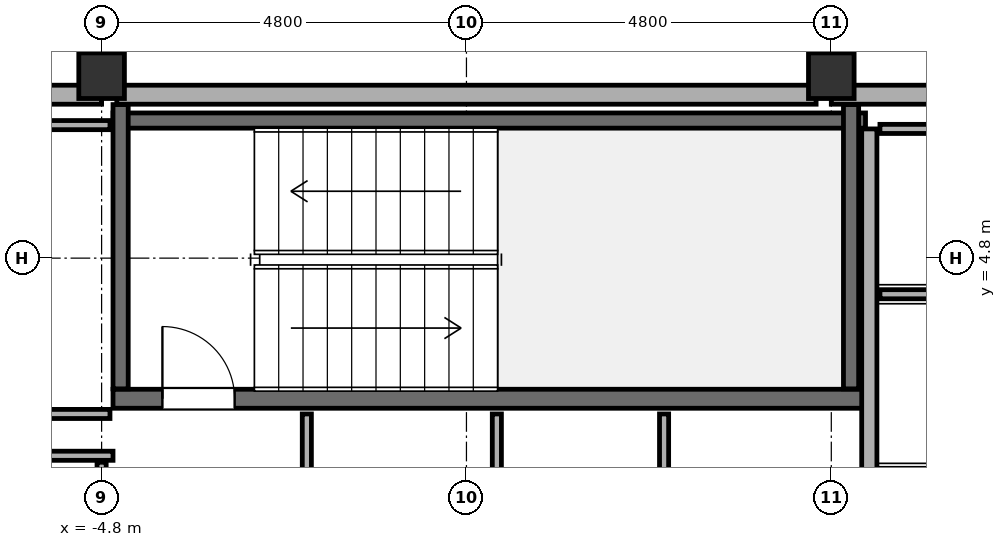
"""IFC4 building model, lengths in metres.
Left out: names, types, materials, properties, quantities, classifications, styles, units other than length and angle.
Written with IfcOpenShell. Run it as: python <this file> out.ifc"""

import sys

from ifc_helpers import new_model, si_unit, direction, frame, frame_2d, origin, origin_2d, place, context, subcontext, project, spatial, rectangle, hollow_rectangle, extrude, element, fill, save


model = new_model("IFC4")
c1 = context("Model", 3, precision=1e-05, world=origin(), true_north=direction((0.0, 1.0)))
c2 = subcontext(c1, "Body", "Model", "MODEL_VIEW")
j1 = project(units=[si_unit("LENGTHUNIT", "METRE"), si_unit("PLANEANGLEUNIT", "RADIAN")], contexts=[c1])
p1 = place(None, origin())
s1 = spatial("IfcSite", under=j1, at=p1, CompositionType="ELEMENT")
p2 = place(p1, origin())
s2 = spatial("IfcBuilding", under=s1, at=p2, CompositionType="ELEMENT")
p3 = place(p2, frame((0.0, 0.0, 222.3)))
s3 = spatial("IfcBuildingStorey", under=s2, at=p3, CompositionType="ELEMENT", Elevation=222.3)
for number, where, z_axis, x_axis in (
    (1, (-4.8, 7.2, 0.0), (0.0, 0.0, 1.0), (1.0, 0.0, 0.0)),
    (2, (4.8, 7.2, 0.0), (0.0, 0.0, 1.0), (1.0, 0.0, 0.0)),
):
    element("IfcColumn", number, at=place(p3, frame(where, z_axis=z_axis, x_axis=x_axis)), inside=s3, PredefinedType="COLUMN", context=c2, shape_type="SweptSolid", body=[
        extrude(hollow_rectangle(XDim=0.6, YDim=0.6, WallThickness=0.028, at=origin_2d()), origin(), (0.0, 0.0, 1.0), 3.85),
    ])
p4 = place(p3, frame((-14.2, 6.95, 0.0), z_axis=(0.0, 0.0, 1.0), x_axis=(1.0, 0.0, 0.0)))
e3 = element("IfcWall", 3, at=p4, inside=s3, PredefinedType="SOLIDWALL", context=c2, shape_type="SweptSolid", body=[
    extrude(rectangle(XDim=9.4, YDim=0.25, at=frame_2d((4.7, 0.0))), origin(), (0.0, 0.0, 1.0), 2.27),
])
p5 = place(p4, frame((4.9, 0.0, 0.0)))
e4 = element("IfcOpeningElement", 4, at=p5, cuts=e3, PredefinedType="OPENING", context=c2, shape_type="SweptSolid", body=[
    extrude(rectangle(XDim=1.0, YDim=2.15, at=frame_2d((0.5, 1.075))), frame((0.0, 0.14, 0.0), z_axis=(0.0, -1.0, 0.0), x_axis=(1.0, 0.0, 0.0)), (0.0, 0.0, 1.0), 0.28),
])
p6 = place(p3, frame((-4.6, 6.95, 0.0), z_axis=(0.0, 0.0, 1.0), x_axis=(1.0, 0.0, 0.0)))
e5 = element("IfcWall", 5, at=p6, inside=s3, PredefinedType="SOLIDWALL", context=c2, shape_type="SweptSolid", body=[
    extrude(rectangle(XDim=9.2, YDim=0.25, at=frame_2d((4.6, 0.0))), origin(), (0.0, 0.0, 1.0), 2.27),
])
p7 = place(p3, frame((4.8, 6.95, 0.0), z_axis=(0.0, 0.0, 1.0), x_axis=(1.0, 0.0, 0.0)))
e6 = element("IfcWall", 6, at=p7, inside=s3, PredefinedType="SOLIDWALL", context=c2, shape_type="SweptSolid", body=[
    extrude(rectangle(XDim=9.4, YDim=0.25, at=frame_2d((4.7, 0.0))), origin(), (0.0, 0.0, 1.0), 2.27),
])
p8 = place(p7, frame((3.5, 0.0, 0.0)))
e7 = element("IfcOpeningElement", 7, at=p8, cuts=e6, PredefinedType="OPENING", context=c2, shape_type="SweptSolid", body=[
    extrude(rectangle(XDim=1.2, YDim=2.2, at=frame_2d((0.6, 1.1))), frame((0.0, 0.14, 0.0), z_axis=(0.0, -1.0, 0.0), x_axis=(1.0, 0.0, 0.0)), (0.0, 0.0, 1.0), 0.28),
])
p9 = place(p3, frame((-4.65, 2.95, -0.18), z_axis=(0.0, 0.0, 1.0), x_axis=(1.0, 0.0, 0.0)))
e8 = element("IfcWall", 8, at=p9, inside=s3, PredefinedType="SOLIDWALL", context=c2, shape_type="SweptSolid", body=[
    extrude(rectangle(XDim=9.9, YDim=0.25, at=frame_2d((4.95, 0.0))), origin(), (0.0, 0.0, 1.0), 3.85),
])
p10 = place(p9, frame((0.65, 0.0, 0.18)))
e9 = element("IfcOpeningElement", 9, at=p10, cuts=e8, PredefinedType="OPENING", context=c2, shape_type="SweptSolid", body=[
    extrude(rectangle(XDim=0.95, YDim=2.15, at=frame_2d((0.475, 1.075))), frame((0.0, 0.14, 0.0), z_axis=(0.0, -1.0, 0.0), x_axis=(1.0, 0.0, 0.0)), (0.0, 0.0, 1.0), 0.28),
])
p11 = place(p3, frame((-4.65, 6.61, -0.18), z_axis=(0.0, 0.0, 1.0), x_axis=(1.0, 0.0, 0.0)))
e10 = element("IfcWall", 10, at=p11, inside=s3, PredefinedType="SOLIDWALL", context=c2, shape_type="SweptSolid", body=[
    extrude(rectangle(XDim=9.9, YDim=0.2, at=frame_2d((4.95, 0.0))), origin(), (0.0, 0.0, 1.0), 3.85),
])
for number, where, z_axis, x_axis in (
    (11, (-4.55, 3.08, -0.18), (0.0, 0.0, 1.0), (0.0, 1.0, 0.0)),
    (12, (5.06, 3.08, -0.18), (0.0, 0.0, 1.0), (0.0, 1.0, 0.0)),
):
    element("IfcWall", number, at=place(p3, frame(where, z_axis=z_axis, x_axis=x_axis)), inside=s3, PredefinedType="SOLIDWALL", context=c2, shape_type="SweptSolid", body=[
        extrude(rectangle(XDim=3.74, YDim=0.2, at=frame_2d((1.87, 0.0))), origin(), (0.0, 0.0, 1.0), 3.85),
    ])
p12 = place(p3, frame((5.3, -0.3, 0.0), z_axis=(0.0, 0.0, 1.0), x_axis=(0.0, 1.0, 0.0)))
e13 = element("IfcWall", 13, at=p12, inside=s3, PredefinedType="SOLIDWALL", context=c2, shape_type="SweptSolid", body=[
    extrude(rectangle(XDim=6.8, YDim=0.2, at=frame_2d((3.4, 0.0))), origin(), (0.0, 0.0, 1.0), 3.67),
])
for number, where, z_axis, x_axis in (
    (14, (5.44, 4.325, 0.0), (0.0, 0.0, 1.0), (1.0, 0.0, 0.0)),
    (15, (5.44, 6.5, 0.0), (0.0, 0.0, 1.0), (1.0, 0.0, 0.0)),
):
    element("IfcWall", number, at=place(p3, frame(where, z_axis=z_axis, x_axis=x_axis)), inside=s3, PredefinedType="PARTITIONING", context=c2, shape_type="SweptSolid", body=[
        extrude(rectangle(XDim=2.12, YDim=0.12, at=frame_2d((1.06, 0.0))), origin(), (0.0, 0.0, 1.0), 3.67),
    ])
p13 = place(p3, frame((-7.0, 2.2, 0.0), z_axis=(0.0, 0.0, 1.0), x_axis=(1.0, 0.0, 0.0)))
e16 = element("IfcWall", 16, at=p13, inside=s3, PredefinedType="PARTITIONING", context=c2, shape_type="SweptSolid", body=[
    extrude(rectangle(XDim=2.35, YDim=0.12, at=frame_2d((1.175, 0.0))), origin(), (0.0, 0.0, 1.0), 3.67),
])
for number, where, z_axis, x_axis in (
    (17, (-7.0, 2.75, 0.0), (0.0, 0.0, 1.0), (1.0, 0.0, 0.0)),
    (18, (-7.0, 6.55, 0.0), (0.0, 0.0, 1.0), (1.0, 0.0, 0.0)),
):
    element("IfcWall", number, at=place(p3, frame(where, z_axis=z_axis, x_axis=x_axis)), inside=s3, PredefinedType="PARTITIONING", context=c2, shape_type="SweptSolid", body=[
        extrude(rectangle(XDim=2.31, YDim=0.12, at=frame_2d((1.155, 0.0))), origin(), (0.0, 0.0, 1.0), 3.67),
    ])
p14 = place(p3, frame((-4.8, -6.415, 0.0), z_axis=(0.0, 0.0, 1.0), x_axis=(0.0, 1.0, 0.0)))
e19 = element("IfcWall", 19, at=p14, inside=s3, PredefinedType="PARTITIONING", context=c2, shape_type="SweptSolid", body=[
    extrude(rectangle(XDim=8.53, YDim=0.12, at=frame_2d((4.265, 0.0))), origin(), (0.0, 0.0, 1.0), 3.67),
])
p15 = place(p14, frame((3.965, 0.0, 0.0)))
e20 = element("IfcOpeningElement", 20, at=p15, cuts=e19, PredefinedType="OPENING", context=c2, shape_type="SweptSolid", body=[
    extrude(rectangle(XDim=0.9, YDim=2.1, at=frame_2d((0.45, 1.05))), frame((0.0, 0.075, 0.0), z_axis=(0.0, -1.0, 0.0), x_axis=(1.0, 0.0, 0.0)), (0.0, 0.0, 1.0), 0.15),
])
p16 = place(p3, frame((-2.1, -6.415, 0.0), z_axis=(0.0, 0.0, 1.0), x_axis=(0.0, 1.0, 0.0)))
e21 = element("IfcWall", 21, at=p16, inside=s3, PredefinedType="PARTITIONING", context=c2, shape_type="SweptSolid", body=[
    extrude(rectangle(XDim=9.165, YDim=0.12, at=frame_2d((4.583, 0.0))), origin(), (0.0, 0.0, 1.0), 3.67),
])
p17 = place(p16, frame((1.765, 0.0, 0.0)))
e22 = element("IfcOpeningElement", 22, at=p17, cuts=e21, PredefinedType="OPENING", context=c2, shape_type="SweptSolid", body=[
    extrude(rectangle(XDim=0.9, YDim=2.1, at=frame_2d((0.45, 1.05))), frame((0.0, 0.075, 0.0), z_axis=(0.0, -1.0, 0.0), x_axis=(1.0, 0.0, 0.0)), (0.0, 0.0, 1.0), 0.15),
])
p18 = place(p16, frame((6.565, 0.0, 0.0)))
e23 = element("IfcOpeningElement", 23, at=p18, cuts=e21, PredefinedType="OPENING", context=c2, shape_type="SweptSolid", body=[
    extrude(rectangle(XDim=0.9, YDim=2.1, at=frame_2d((0.45, 1.05))), frame((0.0, 0.075, 0.0), z_axis=(0.0, -1.0, 0.0), x_axis=(1.0, 0.0, 0.0)), (0.0, 0.0, 1.0), 0.15),
])
p19 = place(p3, frame((0.4, -6.415, 0.0), z_axis=(0.0, 0.0, 1.0), x_axis=(0.0, 1.0, 0.0)))
e24 = element("IfcWall", 24, at=p19, inside=s3, PredefinedType="PARTITIONING", context=c2, shape_type="SweptSolid", body=[
    extrude(rectangle(XDim=9.165, YDim=0.12, at=frame_2d((4.583, 0.0))), origin(), (0.0, 0.0, 1.0), 3.67),
])
p20 = place(p3, frame((2.6, 0.3, 0.0), z_axis=(0.0, 0.0, 1.0), x_axis=(0.0, 1.0, 0.0)))
e25 = element("IfcWall", 25, at=p20, inside=s3, PredefinedType="PARTITIONING", context=c2, shape_type="SweptSolid", body=[
    extrude(rectangle(XDim=2.45, YDim=0.12, at=frame_2d((1.225, 0.0))), origin(), (0.0, 0.0, 1.0), 3.67),
])
p21 = place(p20, frame((0.75, 0.0, 0.0)))
e26 = element("IfcOpeningElement", 26, at=p21, cuts=e25, PredefinedType="OPENING", context=c2, shape_type="SweptSolid", body=[
    extrude(rectangle(XDim=0.9, YDim=2.1, at=frame_2d((0.45, 1.05))), frame((0.0, 0.075, 0.0), z_axis=(0.0, -1.0, 0.0), x_axis=(1.0, 0.0, 0.0)), (0.0, 0.0, 1.0), 0.15),
])
p22 = place(p10, origin())
e27 = element("IfcDoor", 27, at=p22, inside=s3, OperationType="SINGLE_SWING_LEFT", PredefinedType="DOOR", context=c2, shape_type="SweptSolid", body=[
    extrude(rectangle(XDim=0.95, YDim=2.15, at=frame_2d((0.475, 1.075))), frame((0.0, 0.025, 0.0), z_axis=(0.0, -1.0, 0.0), x_axis=(1.0, 0.0, 0.0)), (0.0, 0.0, 1.0), 0.05),
])
fill(e9, e27)
save(model, sys.argv[1])
